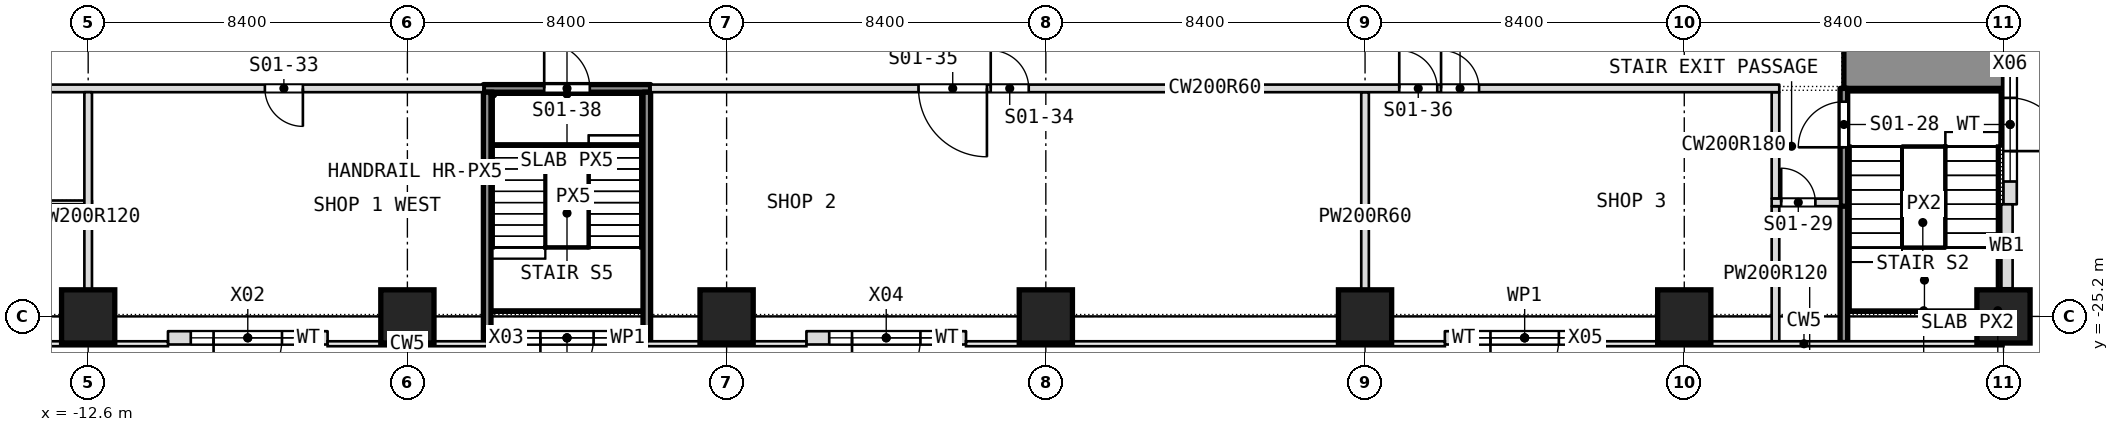
"""IFC4 building model, lengths in metres.
Left out: names, types, materials, properties, quantities, classifications, styles, units other than length and angle.
Written with IfcOpenShell. Run it as: python <this file> out.ifc"""

import sys

from ifc_helpers import new_model, si_unit, direction, frame, frame_2d, origin, origin_2d, place, context, subcontext, project, spatial, rectangle, extrude, element, fill, save


model = new_model("IFC4")
c1 = context("Model", 3, precision=1e-05, world=origin(), true_north=direction((0.0, 1.0)))
c2 = subcontext(c1, "Body", "Model", "MODEL_VIEW")
j1 = project(units=[si_unit("LENGTHUNIT", "METRE"), si_unit("PLANEANGLEUNIT", "RADIAN")], contexts=[c1])
p1 = place(None, origin())
s1 = spatial("IfcSite", under=j1, at=p1, CompositionType="ELEMENT")
p2 = place(p1, origin())
s2 = spatial("IfcBuilding", under=s1, at=p2, CompositionType="ELEMENT")
p3 = place(p2, origin())
s3 = spatial("IfcBuildingStorey", under=s2, at=p3, CompositionType="ELEMENT", Elevation=0.0)
for number, where, z_axis, x_axis in (
    (1, (-12.6, -25.2, -0.3), (0.0, 0.0, 1.0), (1.0, 0.0, 0.0)),
    (2, (-4.2, -25.2, -0.3), (0.0, 0.0, 1.0), (1.0, 0.0, 0.0)),
    (3, (4.2, -25.2, -0.3), (0.0, 0.0, 1.0), (1.0, 0.0, 0.0)),
    (4, (12.6, -25.2, -0.3), (0.0, 0.0, 1.0), (1.0, 0.0, 0.0)),
    (5, (21.0, -25.2, -0.3), (0.0, 0.0, 1.0), (1.0, 0.0, 0.0)),
    (6, (29.4, -25.2, -0.3), (0.0, 0.0, 1.0), (1.0, 0.0, 0.0)),
    (7, (37.8, -25.2, -0.3), (0.0, 0.0, 1.0), (1.0, 0.0, 0.0)),
):
    element("IfcColumn", number, at=place(p3, frame(where, z_axis=z_axis, x_axis=x_axis)), inside=s3, PredefinedType="COLUMN", context=c2, shape_type="SweptSolid", body=[
        extrude(rectangle(XDim=1.4, YDim=1.4, at=origin_2d()), origin(), (0.0, 0.0, 1.0), 8.3),
    ])
p4 = place(p3, frame((33.6, -18.0, -0.3), z_axis=(0.0, 0.0, 1.0), x_axis=(1.0, 0.0, 0.0)))
e8 = element("IfcWall", 8, at=p4, inside=s3, PredefinedType="SOLIDWALL", context=c2, shape_type="SweptSolid", body=[
    extrude(rectangle(XDim=4.2, YDim=2.4, at=frame_2d((2.1, 0.0))), origin(), (0.0, 0.0, 1.0), 8.3),
])
p5 = place(p3, frame((33.6, -25.889, 0.0), z_axis=(0.0, 0.0, 1.0), x_axis=(0.0, 1.0, 0.0)))
e9 = element("IfcWall", 9, at=p5, inside=s3, PredefinedType="PARTITIONING", context=c2, shape_type="SweptSolid", body=[
    extrude(rectangle(XDim=3.789, YDim=0.2, at=frame_2d((1.895, 0.0))), origin(), (0.0, 0.0, 1.0), 7.68),
])
p6 = place(p3, frame((33.6, -22.3, 0.0), z_axis=(0.0, 0.0, 1.0), x_axis=(0.0, 1.0, 0.0)))
e10 = element("IfcWall", 10, at=p6, inside=s3, PredefinedType="PARTITIONING", context=c2, shape_type="SweptSolid", body=[
    extrude(rectangle(XDim=3.1, YDim=0.2, at=frame_2d((1.55, 0.0))), origin(), (0.0, 0.0, 1.0), 7.68),
])
p7 = place(p6, frame((1.55, 0.0, 0.0)))
e11 = element("IfcOpeningElement", 11, at=p7, cuts=e10, PredefinedType="OPENING", context=c2, shape_type="SweptSolid", body=[
    extrude(rectangle(XDim=1.2, YDim=2.1, at=frame_2d((0.6, 1.05))), frame((0.0, 0.1, 0.0), z_axis=(0.0, -1.0, 0.0), x_axis=(1.0, 0.0, 0.0)), (0.0, 0.0, 1.0), 0.2),
])
p8 = place(p3, frame((31.8, -25.889, 0.0), z_axis=(0.0, 0.0, 1.0), x_axis=(0.0, 1.0, 0.0)))
e12 = element("IfcWall", 12, at=p8, inside=s3, PredefinedType="PARTITIONING", context=c2, shape_type="SweptSolid", body=[
    extrude(rectangle(XDim=3.589, YDim=0.2, at=frame_2d((1.794, 0.0))), origin(), (0.0, 0.0, 1.0), 7.68),
])
p9 = place(p3, frame((31.8, -22.1, 0.0), z_axis=(0.0, 0.0, 1.0), x_axis=(0.0, 1.0, 0.0)))
e13 = element("IfcWall", 13, at=p9, inside=s3, PredefinedType="PARTITIONING", context=c2, shape_type="SweptSolid", body=[
    extrude(rectangle(XDim=2.8, YDim=0.2, at=frame_2d((1.4, 0.0))), origin(), (0.0, 0.0, 1.0), 7.68),
])
p10 = place(p3, frame((31.7, -22.2, 0.0), z_axis=(0.0, 0.0, 1.0), x_axis=(1.0, 0.0, 0.0)))
e14 = element("IfcWall", 14, at=p10, inside=s3, PredefinedType="PARTITIONING", context=c2, shape_type="SweptSolid", body=[
    extrude(rectangle(XDim=1.8, YDim=0.2, at=frame_2d((0.9, 0.0))), origin(), (0.0, 0.0, 1.0), 7.68),
])
p11 = place(p10, frame((0.25, 0.0, 0.0)))
e15 = element("IfcOpeningElement", 15, at=p11, cuts=e14, PredefinedType="OPENING", context=c2, shape_type="SweptSolid", body=[
    extrude(rectangle(XDim=0.9, YDim=2.1, at=frame_2d((0.45, 1.05))), frame((0.0, 0.1, 0.0), z_axis=(0.0, -1.0, 0.0), x_axis=(1.0, 0.0, 0.0)), (0.0, 0.0, 1.0), 0.2),
])
p12 = place(p3, frame((-29.45, -22.2, 0.0), z_axis=(0.0, 0.0, 1.0), x_axis=(1.0, 0.0, 0.0)))
e16 = element("IfcWall", 16, at=p12, inside=s3, PredefinedType="PARTITIONING", context=c2, shape_type="SweptSolid", body=[
    extrude(rectangle(XDim=16.95, YDim=0.1, at=frame_2d((8.475, 0.0))), origin(), (0.0, 0.0, 1.0), 7.68),
])
p13 = place(p12, frame((7.975, 0.0, 0.0)))
e17 = element("IfcOpeningElement", 17, at=p13, cuts=e16, PredefinedType="OPENING", context=c2, shape_type="SweptSolid", body=[
    extrude(rectangle(XDim=1.0, YDim=2.1, at=frame_2d((0.5, 1.05))), frame((0.0, 0.05, 0.0), z_axis=(0.0, -1.0, 0.0), x_axis=(1.0, 0.0, 0.0)), (0.0, 0.0, 1.0), 0.1),
])
p14 = place(p3, frame((21.0, -25.889, 0.0), z_axis=(0.0, 0.0, 1.0), x_axis=(0.0, 1.0, 0.0)))
e18 = element("IfcWall", 18, at=p14, inside=s3, PredefinedType="PARTITIONING", context=c2, shape_type="SweptSolid", body=[
    extrude(rectangle(XDim=6.589, YDim=0.2, at=frame_2d((3.294, 0.0))), origin(), (0.0, 0.0, 1.0), 7.68),
])
p15 = place(p3, frame((-31.9, -19.2, 0.0), z_axis=(0.0, 0.0, 1.0), x_axis=(1.0, 0.0, 0.0)))
e19 = element("IfcWall", 19, at=p15, inside=s3, PredefinedType="PARTITIONING", context=c2, shape_type="SweptSolid", body=[
    extrude(rectangle(XDim=29.7, YDim=0.2, at=frame_2d((14.85, 0.0))), origin(), (0.0, 0.0, 1.0), 7.68),
])
p16 = place(p15, frame((13.2, 0.0, 0.0)))
e20 = element("IfcOpeningElement", 20, at=p16, cuts=e19, PredefinedType="OPENING", context=c2, shape_type="SweptSolid", body=[
    extrude(rectangle(XDim=1.0, YDim=2.1, at=frame_2d((0.5, 1.05))), frame((0.0, 0.1, 0.0), z_axis=(0.0, -1.0, 0.0), x_axis=(1.0, 0.0, 0.0)), (0.0, 0.0, 1.0), 0.2),
])
p17 = place(p15, frame((12.1, 0.0, 0.0)))
e21 = element("IfcOpeningElement", 21, at=p17, cuts=e19, PredefinedType="OPENING", context=c2, shape_type="SweptSolid", body=[
    extrude(rectangle(XDim=1.0, YDim=2.1, at=frame_2d((0.5, 1.05))), frame((0.0, 0.1, 0.0), z_axis=(0.0, -1.0, 0.0), x_axis=(1.0, 0.0, 0.0)), (0.0, 0.0, 1.0), 0.2),
])
p18 = place(p15, frame((23.95, 0.0, 0.0)))
e22 = element("IfcOpeningElement", 22, at=p18, cuts=e19, PredefinedType="OPENING", context=c2, shape_type="SweptSolid", body=[
    extrude(rectangle(XDim=1.0, YDim=2.1, at=frame_2d((0.5, 1.05))), frame((0.0, 0.1, 0.0), z_axis=(0.0, -1.0, 0.0), x_axis=(1.0, 0.0, 0.0)), (0.0, 0.0, 1.0), 0.2),
])
p19 = place(p3, frame((2.2, -19.2, 0.0), z_axis=(0.0, 0.0, 1.0), x_axis=(1.0, 0.0, 0.0)))
e23 = element("IfcWall", 23, at=p19, inside=s3, PredefinedType="PARTITIONING", context=c2, shape_type="SweptSolid", body=[
    extrude(rectangle(XDim=29.7, YDim=0.2, at=frame_2d((14.85, 0.0))), origin(), (0.0, 0.0, 1.0), 7.68),
])
p20 = place(p19, frame((8.95, 0.0, 0.0)))
e24 = element("IfcOpeningElement", 24, at=p20, cuts=e23, PredefinedType="OPENING", context=c2, shape_type="SweptSolid", body=[
    extrude(rectangle(XDim=1.0, YDim=2.1, at=frame_2d((0.5, 1.05))), frame((0.0, 0.1, 0.0), z_axis=(0.0, -1.0, 0.0), x_axis=(1.0, 0.0, 0.0)), (0.0, 0.0, 1.0), 0.2),
])
p21 = place(p19, frame((7.05, 0.0, 0.0)))
e25 = element("IfcOpeningElement", 25, at=p21, cuts=e23, PredefinedType="OPENING", context=c2, shape_type="SweptSolid", body=[
    extrude(rectangle(XDim=1.8, YDim=2.1, at=frame_2d((0.9, 1.05))), frame((0.0, 0.1, 0.0), z_axis=(0.0, -1.0, 0.0), x_axis=(1.0, 0.0, 0.0)), (0.0, 0.0, 1.0), 0.2),
])
p22 = place(p19, frame((19.7, 0.0, 0.0)))
e26 = element("IfcOpeningElement", 26, at=p22, cuts=e23, PredefinedType="OPENING", context=c2, shape_type="SweptSolid", body=[
    extrude(rectangle(XDim=1.0, YDim=2.1, at=frame_2d((0.5, 1.05))), frame((0.0, 0.1, 0.0), z_axis=(0.0, -1.0, 0.0), x_axis=(1.0, 0.0, 0.0)), (0.0, 0.0, 1.0), 0.2),
])
p23 = place(p19, frame((20.8, 0.0, 0.0)))
e27 = element("IfcOpeningElement", 27, at=p23, cuts=e23, PredefinedType="OPENING", context=c2, shape_type="SweptSolid", body=[
    extrude(rectangle(XDim=1.0, YDim=2.1, at=frame_2d((0.5, 1.05))), frame((0.0, 0.1, 0.0), z_axis=(0.0, -1.0, 0.0), x_axis=(1.0, 0.0, 0.0)), (0.0, 0.0, 1.0), 0.2),
])
p24 = place(p3, frame((-2.2, -19.2, 0.0), z_axis=(0.0, 0.0, 1.0), x_axis=(1.0, 0.0, 0.0)))
e28 = element("IfcWall", 28, at=p24, inside=s3, PredefinedType="PARTITIONING", context=c2, shape_type="SweptSolid", body=[
    extrude(rectangle(XDim=4.4, YDim=0.2, at=frame_2d((2.2, 0.0))), origin(), (0.0, 0.0, 1.0), 7.68),
])
p25 = place(p24, frame((1.6, 0.0, 0.0)))
e29 = element("IfcOpeningElement", 29, at=p25, cuts=e28, PredefinedType="OPENING", context=c2, shape_type="SweptSolid", body=[
    extrude(rectangle(XDim=1.2, YDim=2.1, at=frame_2d((0.6, 1.05))), frame((0.0, 0.1, 0.0), z_axis=(0.0, -1.0, 0.0), x_axis=(1.0, 0.0, 0.0)), (0.0, 0.0, 1.0), 0.2),
])
for number, where, z_axis, x_axis in (
    (30, (2.1, -25.889, 0.0), (0.0, 0.0, 1.0), (0.0, 1.0, 0.0)),
    (31, (-2.1, -25.889, 0.0), (0.0, 0.0, 1.0), (0.0, 1.0, 0.0)),
    (32, (-12.6, -25.889, 0.0), (0.0, 0.0, 1.0), (0.0, 1.0, 0.0)),
):
    element("IfcWall", number, at=place(p3, frame(where, z_axis=z_axis, x_axis=x_axis)), inside=s3, PredefinedType="PARTITIONING", context=c2, shape_type="SweptSolid", body=[
        extrude(rectangle(XDim=6.589, YDim=0.2, at=frame_2d((3.294, 0.0))), origin(), (0.0, 0.0, 1.0), 7.68),
    ])
p26 = place(p3, frame((-10.5, -25.764, 0.0), z_axis=(0.0, 0.0, 1.0), x_axis=(1.0, 0.0, 0.0)))
e33 = element("IfcWall", 33, at=p26, inside=s3, PredefinedType="NOTDEFINED", context=c2, shape_type="SweptSolid", body=[
    extrude(rectangle(XDim=4.2, YDim=0.35, at=frame_2d((2.1, 0.0))), origin(), (0.0, 0.0, 1.0), 8.0),
])
p27 = place(p26, frame((1.2, 0.0, 0.0)))
e34 = element("IfcOpeningElement", 34, at=p27, cuts=e33, PredefinedType="OPENING", context=c2, shape_type="SweptSolid", body=[
    extrude(rectangle(XDim=1.8, YDim=2.4, at=frame_2d((0.9, 1.2))), frame((0.0, 0.175, 0.0), z_axis=(0.0, -1.0, 0.0), x_axis=(1.0, 0.0, 0.0)), (0.0, 0.0, 1.0), 0.35),
])
p28 = place(p26, frame((0.6, 0.0, 2.9)))
e35 = element("IfcOpeningElement", 35, at=p28, cuts=e33, PredefinedType="OPENING", context=c2, shape_type="SweptSolid", body=[
    extrude(rectangle(XDim=3.0, YDim=2.6, at=frame_2d((1.5, 1.3))), frame((0.0, 0.175, 0.0), z_axis=(0.0, -1.0, 0.0), x_axis=(1.0, 0.0, 0.0)), (0.0, 0.0, 1.0), 0.35),
])
p29 = place(p3, frame((-2.1, -25.764, 0.0), z_axis=(0.0, 0.0, 1.0), x_axis=(1.0, 0.0, 0.0)))
e36 = element("IfcWall", 36, at=p29, inside=s3, PredefinedType="NOTDEFINED", context=c2, shape_type="SweptSolid", body=[
    extrude(rectangle(XDim=4.2, YDim=0.35, at=frame_2d((2.1, 0.0))), origin(), (0.0, 0.0, 1.0), 8.0),
])
p30 = place(p29, frame((1.4, 0.0, 0.0)))
e37 = element("IfcOpeningElement", 37, at=p30, cuts=e36, PredefinedType="OPENING", context=c2, shape_type="SweptSolid", body=[
    extrude(rectangle(XDim=1.4, YDim=2.2, at=frame_2d((0.7, 1.1))), frame((0.0, 0.175, 0.0), z_axis=(0.0, -1.0, 0.0), x_axis=(1.0, 0.0, 0.0)), (0.0, 0.0, 1.0), 0.35),
])
p31 = place(p29, frame((0.6, 0.0, 2.9)))
e38 = element("IfcOpeningElement", 38, at=p31, cuts=e36, PredefinedType="OPENING", context=c2, shape_type="SweptSolid", body=[
    extrude(rectangle(XDim=3.0, YDim=2.6, at=frame_2d((1.5, 1.3))), frame((0.0, 0.175, 0.0), z_axis=(0.0, -1.0, 0.0), x_axis=(1.0, 0.0, 0.0)), (0.0, 0.0, 1.0), 0.35),
])
p32 = place(p3, frame((6.3, -25.764, 0.0), z_axis=(0.0, 0.0, 1.0), x_axis=(1.0, 0.0, 0.0)))
e39 = element("IfcWall", 39, at=p32, inside=s3, PredefinedType="NOTDEFINED", context=c2, shape_type="SweptSolid", body=[
    extrude(rectangle(XDim=4.2, YDim=0.35, at=frame_2d((2.1, 0.0))), origin(), (0.0, 0.0, 1.0), 8.0),
])
p33 = place(p32, frame((1.2, 0.0, 0.0)))
e40 = element("IfcOpeningElement", 40, at=p33, cuts=e39, PredefinedType="OPENING", context=c2, shape_type="SweptSolid", body=[
    extrude(rectangle(XDim=1.8, YDim=2.4, at=frame_2d((0.9, 1.2))), frame((0.0, 0.175, 0.0), z_axis=(0.0, -1.0, 0.0), x_axis=(1.0, 0.0, 0.0)), (0.0, 0.0, 1.0), 0.35),
])
p34 = place(p32, frame((0.6, 0.0, 2.9)))
e41 = element("IfcOpeningElement", 41, at=p34, cuts=e39, PredefinedType="OPENING", context=c2, shape_type="SweptSolid", body=[
    extrude(rectangle(XDim=3.0, YDim=2.6, at=frame_2d((1.5, 1.3))), frame((0.0, 0.175, 0.0), z_axis=(0.0, -1.0, 0.0), x_axis=(1.0, 0.0, 0.0)), (0.0, 0.0, 1.0), 0.35),
])
p35 = place(p3, frame((23.1, -25.764, 0.0), z_axis=(0.0, 0.0, 1.0), x_axis=(1.0, 0.0, 0.0)))
e42 = element("IfcWall", 42, at=p35, inside=s3, PredefinedType="NOTDEFINED", context=c2, shape_type="SweptSolid", body=[
    extrude(rectangle(XDim=4.2, YDim=0.35, at=frame_2d((2.1, 0.0))), origin(), (0.0, 0.0, 1.0), 8.0),
])
p36 = place(p35, frame((1.2, 0.0, 0.0)))
e43 = element("IfcOpeningElement", 43, at=p36, cuts=e42, PredefinedType="OPENING", context=c2, shape_type="SweptSolid", body=[
    extrude(rectangle(XDim=1.8, YDim=2.4, at=frame_2d((0.9, 1.2))), frame((0.0, 0.175, 0.0), z_axis=(0.0, -1.0, 0.0), x_axis=(1.0, 0.0, 0.0)), (0.0, 0.0, 1.0), 0.35),
])
p37 = place(p35, frame((0.6, 0.0, 2.9)))
e44 = element("IfcOpeningElement", 44, at=p37, cuts=e42, PredefinedType="OPENING", context=c2, shape_type="SweptSolid", body=[
    extrude(rectangle(XDim=3.0, YDim=2.6, at=frame_2d((1.5, 1.3))), frame((0.0, 0.175, 0.0), z_axis=(0.0, -1.0, 0.0), x_axis=(1.0, 0.0, 0.0)), (0.0, 0.0, 1.0), 0.35),
])
p38 = place(p3, frame((37.975, -22.25, 0.0), z_axis=(0.0, 0.0, 1.0), x_axis=(0.0, 1.0, 0.0)))
e45 = element("IfcWall", 45, at=p38, inside=s3, PredefinedType="NOTDEFINED", context=c2, shape_type="SweptSolid", body=[
    extrude(rectangle(XDim=4.2, YDim=0.35, at=frame_2d((2.1, 0.0))), origin(), (0.0, 0.0, 1.0), 6.78),
])
p39 = place(p38, frame((1.4, 0.0, 0.0)))
e46 = element("IfcOpeningElement", 46, at=p39, cuts=e45, PredefinedType="OPENING", context=c2, shape_type="SweptSolid", body=[
    extrude(rectangle(XDim=1.4, YDim=2.2, at=frame_2d((0.7, 1.1))), frame((0.0, 0.175, 0.0), z_axis=(0.0, -1.0, 0.0), x_axis=(1.0, 0.0, 0.0)), (0.0, 0.0, 1.0), 0.35),
])
p40 = place(p38, frame((0.6, 0.0, 2.9)))
e47 = element("IfcOpeningElement", 47, at=p40, cuts=e45, PredefinedType="OPENING", context=c2, shape_type="SweptSolid", body=[
    extrude(rectangle(XDim=3.0, YDim=2.6, at=frame_2d((1.5, 1.3))), frame((0.0, 0.175, 0.0), z_axis=(0.0, -1.0, 0.0), x_axis=(1.0, 0.0, 0.0)), (0.0, 0.0, 1.0), 0.35),
])
p41 = place(p3, frame((37.89, -24.46, 0.0), z_axis=(0.0, 0.0, 1.0), x_axis=(0.0, 1.0, 0.0)))
e48 = element("IfcWall", 48, at=p41, inside=s3, PredefinedType="NOTDEFINED", context=c2, shape_type="SweptSolid", body=[
    extrude(rectangle(XDim=2.21, YDim=0.3, at=frame_2d((1.105, 0.0))), origin(), (0.0, 0.0, 1.0), 6.78),
])
p42 = place(p7, origin())
e49 = element("IfcDoor", 49, at=p42, inside=s3, OperationType="SINGLE_SWING_LEFT", PredefinedType="DOOR", context=c2, shape_type="SweptSolid", body=[
    extrude(rectangle(XDim=1.2, YDim=2.1, at=frame_2d((0.6, 1.05))), frame((0.0, 0.025, 0.0), z_axis=(0.0, -1.0, 0.0), x_axis=(1.0, 0.0, 0.0)), (0.0, 0.0, 1.0), 0.05),
])
fill(e11, e49)
p43 = place(p11, origin())
e50 = element("IfcDoor", 50, at=p43, inside=s3, OperationType="SINGLE_SWING_RIGHT", PredefinedType="DOOR", context=c2, shape_type="SweptSolid", body=[
    extrude(rectangle(XDim=0.9, YDim=2.1, at=frame_2d((0.45, 1.05))), frame((0.0, 0.025, 0.0), z_axis=(0.0, -1.0, 0.0), x_axis=(1.0, 0.0, 0.0)), (0.0, 0.0, 1.0), 0.05),
])
fill(e15, e50)
p44 = place(p18, origin())
e51 = element("IfcDoor", 51, at=p44, inside=s3, OperationType="SINGLE_SWING_RIGHT", PredefinedType="DOOR", context=c2, shape_type="SweptSolid", body=[
    extrude(rectangle(XDim=1.0, YDim=2.1, at=frame_2d((0.5, 1.05))), frame((0.0, 0.025, 0.0), z_axis=(0.0, -1.0, 0.0), x_axis=(1.0, 0.0, 0.0)), (0.0, 0.0, 1.0), 0.05),
])
fill(e22, e51)
p45 = place(p20, origin())
e52 = element("IfcDoor", 52, at=p45, inside=s3, OperationType="SINGLE_SWING_RIGHT", PredefinedType="DOOR", context=c2, shape_type="SweptSolid", body=[
    extrude(rectangle(XDim=1.0, YDim=2.1, at=frame_2d((0.5, 1.05))), frame((0.0, 0.025, 0.0), z_axis=(0.0, -1.0, 0.0), x_axis=(1.0, 0.0, 0.0)), (0.0, 0.0, 1.0), 0.05),
])
fill(e24, e52)
p46 = place(p21, origin())
e53 = element("IfcDoor", 53, at=p46, inside=s3, OperationType="DOUBLE_DOOR_SINGLE_SWING", PredefinedType="DOOR", context=c2, shape_type="SweptSolid", body=[
    extrude(rectangle(XDim=1.8, YDim=2.1, at=frame_2d((0.9, 1.05))), frame((0.0, 0.025, 0.0), z_axis=(0.0, -1.0, 0.0), x_axis=(1.0, 0.0, 0.0)), (0.0, 0.0, 1.0), 0.05),
])
fill(e25, e53)
p47 = place(p22, origin())
e54 = element("IfcDoor", 54, at=p47, inside=s3, OperationType="SINGLE_SWING_LEFT", PredefinedType="DOOR", context=c2, shape_type="SweptSolid", body=[
    extrude(rectangle(XDim=1.0, YDim=2.1, at=frame_2d((0.5, 1.05))), frame((0.0, 0.025, 0.0), z_axis=(0.0, -1.0, 0.0), x_axis=(1.0, 0.0, 0.0)), (0.0, 0.0, 1.0), 0.05),
])
fill(e26, e54)
p48 = place(p23, origin())
e55 = element("IfcDoor", 55, at=p48, inside=s3, OperationType="SINGLE_SWING_LEFT", PredefinedType="DOOR", context=c2, shape_type="SweptSolid", body=[
    extrude(rectangle(XDim=1.0, YDim=2.1, at=frame_2d((0.5, 1.05))), frame((0.0, 0.025, 0.0), z_axis=(0.0, -1.0, 0.0), x_axis=(1.0, 0.0, 0.0)), (0.0, 0.0, 1.0), 0.05),
])
fill(e27, e55)
p49 = place(p25, origin())
e56 = element("IfcDoor", 56, at=p49, inside=s3, OperationType="SINGLE_SWING_RIGHT", PredefinedType="DOOR", context=c2, shape_type="SweptSolid", body=[
    extrude(rectangle(XDim=1.2, YDim=2.1, at=frame_2d((0.6, 1.05))), frame((0.0, 0.025, 0.0), z_axis=(0.0, -1.0, 0.0), x_axis=(1.0, 0.0, 0.0)), (0.0, 0.0, 1.0), 0.05),
])
fill(e29, e56)
p50 = place(p27, frame((1.8, 0.0, 0.0), z_axis=(0.0, 0.0, 1.0), x_axis=(-1.0, 0.0, 0.0)))
e57 = element("IfcDoor", 57, at=p50, inside=s3, OperationType="DOUBLE_DOOR_DOUBLE_SWING", PredefinedType="DOOR", context=c2, shape_type="SweptSolid", body=[
    extrude(rectangle(XDim=1.8, YDim=2.4, at=frame_2d((0.9, 1.2))), frame((0.0, 0.025, 0.0), z_axis=(0.0, -1.0, 0.0), x_axis=(1.0, 0.0, 0.0)), (0.0, 0.0, 1.0), 0.05),
])
fill(e34, e57)
p51 = place(p28, origin())
e58 = element("IfcWindow", 58, at=p51, inside=s3, PartitioningType="SINGLE_PANEL", PredefinedType="WINDOW", context=c2, shape_type="SweptSolid", body=[
    extrude(rectangle(XDim=3.0, YDim=2.6, at=frame_2d((1.5, 1.3))), frame((0.0, 0.03, 0.0), z_axis=(0.0, -1.0, 0.0), x_axis=(1.0, 0.0, 0.0)), (0.0, 0.0, 1.0), 0.06),
])
fill(e35, e58)
p52 = place(p30, frame((1.4, 0.0, 0.0), z_axis=(0.0, 0.0, 1.0), x_axis=(-1.0, 0.0, 0.0)))
e59 = element("IfcDoor", 59, at=p52, inside=s3, OperationType="SINGLE_SWING_LEFT", PredefinedType="DOOR", context=c2, shape_type="SweptSolid", body=[
    extrude(rectangle(XDim=1.4, YDim=2.2, at=frame_2d((0.7, 1.1))), frame((0.0, 0.025, 0.0), z_axis=(0.0, -1.0, 0.0), x_axis=(1.0, 0.0, 0.0)), (0.0, 0.0, 1.0), 0.05),
])
fill(e37, e59)
p53 = place(p31, origin())
e60 = element("IfcWindow", 60, at=p53, inside=s3, PartitioningType="SINGLE_PANEL", PredefinedType="WINDOW", context=c2, shape_type="SweptSolid", body=[
    extrude(rectangle(XDim=3.0, YDim=2.6, at=frame_2d((1.5, 1.3))), frame((0.0, 0.03, 0.0), z_axis=(0.0, -1.0, 0.0), x_axis=(1.0, 0.0, 0.0)), (0.0, 0.0, 1.0), 0.06),
])
fill(e38, e60)
p54 = place(p33, frame((1.8, 0.0, 0.0), z_axis=(0.0, 0.0, 1.0), x_axis=(-1.0, 0.0, 0.0)))
e61 = element("IfcDoor", 61, at=p54, inside=s3, OperationType="DOUBLE_DOOR_DOUBLE_SWING", PredefinedType="DOOR", context=c2, shape_type="SweptSolid", body=[
    extrude(rectangle(XDim=1.8, YDim=2.4, at=frame_2d((0.9, 1.2))), frame((0.0, 0.025, 0.0), z_axis=(0.0, -1.0, 0.0), x_axis=(1.0, 0.0, 0.0)), (0.0, 0.0, 1.0), 0.05),
])
fill(e40, e61)
p55 = place(p34, origin())
e62 = element("IfcWindow", 62, at=p55, inside=s3, PartitioningType="SINGLE_PANEL", PredefinedType="WINDOW", context=c2, shape_type="SweptSolid", body=[
    extrude(rectangle(XDim=3.0, YDim=2.6, at=frame_2d((1.5, 1.3))), frame((0.0, 0.03, 0.0), z_axis=(0.0, -1.0, 0.0), x_axis=(1.0, 0.0, 0.0)), (0.0, 0.0, 1.0), 0.06),
])
fill(e41, e62)
p56 = place(p36, frame((1.8, 0.0, 0.0), z_axis=(0.0, 0.0, 1.0), x_axis=(-1.0, 0.0, 0.0)))
e63 = element("IfcDoor", 63, at=p56, inside=s3, OperationType="DOUBLE_DOOR_DOUBLE_SWING", PredefinedType="DOOR", context=c2, shape_type="SweptSolid", body=[
    extrude(rectangle(XDim=1.8, YDim=2.4, at=frame_2d((0.9, 1.2))), frame((0.0, 0.025, 0.0), z_axis=(0.0, -1.0, 0.0), x_axis=(1.0, 0.0, 0.0)), (0.0, 0.0, 1.0), 0.05),
])
fill(e43, e63)
p57 = place(p37, origin())
e64 = element("IfcWindow", 64, at=p57, inside=s3, PartitioningType="SINGLE_PANEL", PredefinedType="WINDOW", context=c2, shape_type="SweptSolid", body=[
    extrude(rectangle(XDim=3.0, YDim=2.6, at=frame_2d((1.5, 1.3))), frame((0.0, 0.03, 0.0), z_axis=(0.0, -1.0, 0.0), x_axis=(1.0, 0.0, 0.0)), (0.0, 0.0, 1.0), 0.06),
])
fill(e44, e64)
p58 = place(p39, frame((1.4, 0.0, 0.0), z_axis=(0.0, 0.0, 1.0), x_axis=(-1.0, 0.0, 0.0)))
e65 = element("IfcDoor", 65, at=p58, inside=s3, OperationType="SINGLE_SWING_LEFT", PredefinedType="DOOR", context=c2, shape_type="SweptSolid", body=[
    extrude(rectangle(XDim=1.4, YDim=2.2, at=frame_2d((0.7, 1.1))), frame((0.0, 0.025, 0.0), z_axis=(0.0, -1.0, 0.0), x_axis=(1.0, 0.0, 0.0)), (0.0, 0.0, 1.0), 0.05),
])
fill(e46, e65)
p59 = place(p40, origin())
e66 = element("IfcWindow", 66, at=p59, inside=s3, PartitioningType="SINGLE_PANEL", PredefinedType="WINDOW", context=c2, shape_type="SweptSolid", body=[
    extrude(rectangle(XDim=3.0, YDim=2.6, at=frame_2d((1.5, 1.3))), frame((0.0, 0.03, 0.0), z_axis=(0.0, -1.0, 0.0), x_axis=(1.0, 0.0, 0.0)), (0.0, 0.0, 1.0), 0.06),
])
fill(e47, e66)
save(model, sys.argv[1])
